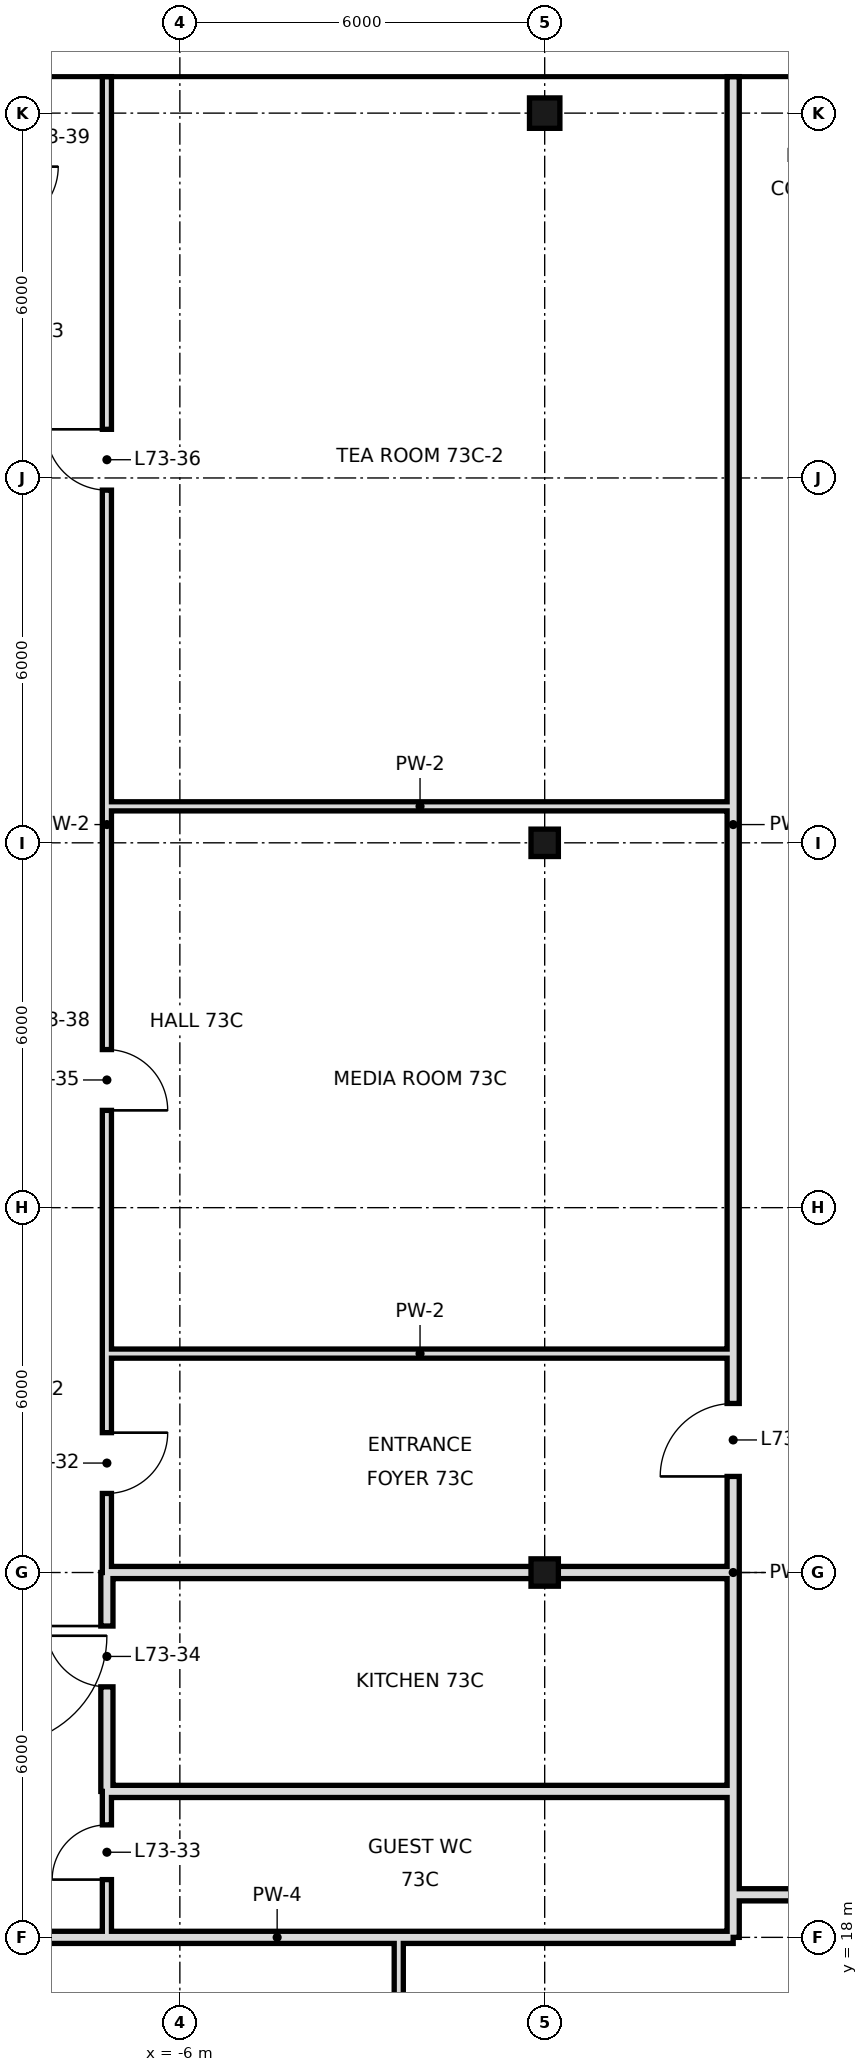
"""IFC4 building model, lengths in metres.
Left out: names, types, materials, properties, quantities, classifications, styles, units other than length and angle.
Written with IfcOpenShell. Run it as: python <this file> out.ifc"""

import sys

from ifc_helpers import new_model, si_unit, direction, frame, frame_2d, origin, origin_2d, place, context, subcontext, project, spatial, rectangle, hollow_rectangle, extrude, element, fill, save


model = new_model("IFC4")
c1 = context("Model", 3, precision=1e-05, world=origin(), true_north=direction((0.0, 1.0)))
c2 = subcontext(c1, "Body", "Model", "MODEL_VIEW")
j1 = project(units=[si_unit("LENGTHUNIT", "METRE"), si_unit("PLANEANGLEUNIT", "RADIAN")], contexts=[c1])
p1 = place(None, origin())
s1 = spatial("IfcSite", under=j1, at=p1, CompositionType="ELEMENT")
p2 = place(p1, origin())
s2 = spatial("IfcBuilding", under=s1, at=p2, CompositionType="ELEMENT")
p3 = place(p2, frame((0.0, 0.0, 308.8)))
s3 = spatial("IfcBuildingStorey", under=s2, at=p3, CompositionType="ELEMENT", Elevation=308.8)
for number, where, z_axis, x_axis in (
    (1, (0.0, 24.0, 0.0), (0.0, 0.0, 1.0), (1.0, 0.0, 0.0)),
    (2, (0.0, 36.0, 0.0), (0.0, 0.0, 1.0), (1.0, 0.0, 0.0)),
):
    element("IfcColumn", number, at=place(p3, frame(where, z_axis=z_axis, x_axis=x_axis)), inside=s3, PredefinedType="COLUMN", context=c2, shape_type="SweptSolid", body=[
        extrude(hollow_rectangle(XDim=0.45, YDim=0.45, WallThickness=0.022, at=origin_2d()), origin(), (0.0, 0.0, 1.0), 3.6),
    ])
p4 = place(p3, frame((0.0, 48.0, 0.0), z_axis=(0.0, 0.0, 1.0), x_axis=(1.0, 0.0, 0.0)))
e3 = element("IfcColumn", 3, at=p4, inside=s3, PredefinedType="COLUMN", context=c2, shape_type="SweptSolid", body=[
    extrude(hollow_rectangle(XDim=0.5, YDim=0.5, WallThickness=0.025, at=origin_2d()), origin(), (0.0, 0.0, 1.0), 3.6),
])
p5 = place(p3, frame((-2.4, 10.8, 0.0), z_axis=(0.0, 0.0, 1.0), x_axis=(0.0, 1.0, 0.0)))
e4 = element("IfcWall", 4, at=p5, inside=s3, PredefinedType="PARTITIONING", context=c2, shape_type="SweptSolid", body=[
    extrude(rectangle(XDim=7.2, YDim=0.15, at=frame_2d((3.6, 0.0))), origin(), (0.0, 0.0, 1.0), 3.42),
])
p6 = place(p3, frame((-7.2, 20.4, 0.0), z_axis=(0.0, 0.0, 1.0), x_axis=(0.0, 1.0, 0.0)))
e5 = element("IfcWall", 5, at=p6, inside=s3, PredefinedType="SOLIDWALL", context=c2, shape_type="SweptSolid", body=[
    extrude(rectangle(XDim=3.6, YDim=0.2, at=frame_2d((1.8, 0.0))), origin(), (0.0, 0.0, 1.0), 2.72),
])
p7 = place(p6, frame((1.72, 0.0, 0.0)))
e6 = element("IfcOpeningElement", 6, at=p7, cuts=e5, PredefinedType="OPENING", context=c2, shape_type="SweptSolid", body=[
    extrude(rectangle(XDim=1.0, YDim=2.4, at=frame_2d((0.5, 1.2))), frame((0.0, 0.11, 0.0), z_axis=(0.0, -1.0, 0.0), x_axis=(1.0, 0.0, 0.0)), (0.0, 0.0, 1.0), 0.22),
])
p8 = place(p3, frame((-7.2, 24.0, 0.0), z_axis=(0.0, 0.0, 1.0), x_axis=(0.0, 1.0, 0.0)))
e7 = element("IfcWall", 7, at=p8, inside=s3, PredefinedType="PARTITIONING", context=c2, shape_type="SweptSolid", body=[
    extrude(rectangle(XDim=24.6, YDim=0.15, at=frame_2d((12.3, 0.0))), origin(), (0.0, 0.0, 1.0), 3.42),
])
p9 = place(p8, frame((1.3, 0.0, 0.0)))
e8 = element("IfcOpeningElement", 8, at=p9, cuts=e7, PredefinedType="OPENING", context=c2, shape_type="SweptSolid", body=[
    extrude(rectangle(XDim=1.0, YDim=2.4, at=frame_2d((0.5, 1.2))), frame((0.0, 0.085, 0.0), z_axis=(0.0, -1.0, 0.0), x_axis=(1.0, 0.0, 0.0)), (0.0, 0.0, 1.0), 0.17),
])
p10 = place(p8, frame((7.6, 0.0, 0.0)))
e9 = element("IfcOpeningElement", 9, at=p10, cuts=e7, PredefinedType="OPENING", context=c2, shape_type="SweptSolid", body=[
    extrude(rectangle(XDim=1.0, YDim=2.4, at=frame_2d((0.5, 1.2))), frame((0.0, 0.085, 0.0), z_axis=(0.0, -1.0, 0.0), x_axis=(1.0, 0.0, 0.0)), (0.0, 0.0, 1.0), 0.17),
])
p11 = place(p8, frame((17.8, 0.0, 0.0)))
e10 = element("IfcOpeningElement", 10, at=p11, cuts=e7, PredefinedType="OPENING", context=c2, shape_type="SweptSolid", body=[
    extrude(rectangle(XDim=1.0, YDim=2.4, at=frame_2d((0.5, 1.2))), frame((0.0, 0.085, 0.0), z_axis=(0.0, -1.0, 0.0), x_axis=(1.0, 0.0, 0.0)), (0.0, 0.0, 1.0), 0.17),
])
p12 = place(p3, frame((-7.2, 18.0, 0.0), z_axis=(0.0, 0.0, 1.0), x_axis=(0.0, 1.0, 0.0)))
e11 = element("IfcWall", 11, at=p12, inside=s3, PredefinedType="PARTITIONING", context=c2, shape_type="SweptSolid", body=[
    extrude(rectangle(XDim=2.4, YDim=0.15, at=frame_2d((1.2, 0.0))), origin(), (0.0, 0.0, 1.0), 3.42),
])
p13 = place(p12, frame((0.95, 0.0, 0.0)))
e12 = element("IfcOpeningElement", 12, at=p13, cuts=e11, PredefinedType="OPENING", context=c2, shape_type="SweptSolid", body=[
    extrude(rectangle(XDim=0.9, YDim=2.4, at=frame_2d((0.45, 1.2))), frame((0.0, 0.085, 0.0), z_axis=(0.0, -1.0, 0.0), x_axis=(1.0, 0.0, 0.0)), (0.0, 0.0, 1.0), 0.17),
])
p14 = place(p3, frame((3.1, 18.7, 0.0), z_axis=(0.0, 0.0, 1.0), x_axis=(0.0, 1.0, 0.0)))
e13 = element("IfcWall", 13, at=p14, inside=s3, PredefinedType="SOLIDWALL", context=c2, shape_type="SweptSolid", body=[
    extrude(rectangle(XDim=1.7, YDim=0.2, at=frame_2d((0.85, 0.0))), origin(), (0.0, 0.0, 1.0), 3.42),
])
p15 = place(p3, frame((3.1, 24.0, 0.0), z_axis=(0.0, 0.0, 1.0), x_axis=(0.0, 1.0, 0.0)))
e14 = element("IfcWall", 14, at=p15, inside=s3, PredefinedType="SOLIDWALL", context=c2, shape_type="SweptSolid", body=[
    extrude(rectangle(XDim=24.6, YDim=0.2, at=frame_2d((12.3, 0.0))), origin(), (0.0, 0.0, 1.0), 2.72),
])
p16 = place(p15, frame((1.58, 0.0, 0.0)))
e15 = element("IfcOpeningElement", 15, at=p16, cuts=e14, PredefinedType="OPENING", context=c2, shape_type="SweptSolid", body=[
    extrude(rectangle(XDim=1.2, YDim=2.4, at=frame_2d((0.6, 1.2))), frame((0.0, 0.11, 0.0), z_axis=(0.0, -1.0, 0.0), x_axis=(1.0, 0.0, 0.0)), (0.0, 0.0, 1.0), 0.22),
])
p17 = place(p3, frame((3.1, 20.4, 0.0), z_axis=(0.0, 0.0, 1.0), x_axis=(0.0, 1.0, 0.0)))
e16 = element("IfcWall", 16, at=p17, inside=s3, PredefinedType="SOLIDWALL", context=c2, shape_type="SweptSolid", body=[
    extrude(rectangle(XDim=3.6, YDim=0.2, at=frame_2d((1.8, 0.0))), origin(), (0.0, 0.0, 1.0), 3.42),
])
p18 = place(p3, frame((3.1, 18.0, 0.0), z_axis=(0.0, 0.0, 1.0), x_axis=(0.0, 1.0, 0.0)))
e17 = element("IfcWall", 17, at=p18, inside=s3, PredefinedType="SOLIDWALL", context=c2, shape_type="SweptSolid", body=[
    extrude(rectangle(XDim=0.7, YDim=0.2, at=frame_2d((0.35, 0.0))), origin(), (0.0, 0.0, 1.0), 2.97),
])
p19 = place(p3, frame((-12.6, 18.0, 0.0), z_axis=(0.0, 0.0, 1.0), x_axis=(1.0, 0.0, 0.0)))
e18 = element("IfcWall", 18, at=p19, inside=s3, PredefinedType="SOLIDWALL", context=c2, shape_type="SweptSolid", body=[
    extrude(rectangle(XDim=15.7, YDim=0.2, at=frame_2d((7.85, 0.0))), origin(), (0.0, 0.0, 1.0), 2.72),
])
p20 = place(p3, frame((3.1, 18.7, 0.0), z_axis=(0.0, 0.0, 1.0), x_axis=(1.0, 0.0, 0.0)))
e19 = element("IfcWall", 19, at=p20, inside=s3, PredefinedType="SOLIDWALL", context=c2, shape_type="SweptSolid", body=[
    extrude(rectangle(XDim=17.3, YDim=0.2, at=frame_2d((8.65, 0.0))), origin(), (0.0, 0.0, 1.0), 2.72),
])
p21 = place(p20, frame((6.12, 0.0, 0.0)))
e20 = element("IfcOpeningElement", 20, at=p21, cuts=e19, PredefinedType="OPENING", context=c2, shape_type="SweptSolid", body=[
    extrude(rectangle(XDim=1.2, YDim=2.4, at=frame_2d((0.6, 1.2))), frame((0.0, 0.11, 0.0), z_axis=(0.0, -1.0, 0.0), x_axis=(1.0, 0.0, 0.0)), (0.0, 0.0, 1.0), 0.22),
])
p22 = place(p20, frame((13.7, 0.0, 0.0)))
e21 = element("IfcOpeningElement", 21, at=p22, cuts=e19, PredefinedType="OPENING", context=c2, shape_type="SweptSolid", body=[
    extrude(rectangle(XDim=1.2, YDim=2.4, at=frame_2d((0.6, 1.2))), frame((0.0, 0.11, 0.0), z_axis=(0.0, -1.0, 0.0), x_axis=(1.0, 0.0, 0.0)), (0.0, 0.0, 1.0), 0.22),
])
for number, where, z_axis, x_axis in (
    (22, (-7.2, 20.4, 0.0), (0.0, 0.0, 1.0), (1.0, 0.0, 0.0)),
    (23, (-7.2, 24.0, 0.0), (0.0, 0.0, 1.0), (1.0, 0.0, 0.0)),
):
    element("IfcWall", number, at=place(p3, frame(where, z_axis=z_axis, x_axis=x_axis)), inside=s3, PredefinedType="SOLIDWALL", context=c2, shape_type="SweptSolid", body=[
        extrude(rectangle(XDim=10.3, YDim=0.2, at=frame_2d((5.15, 0.0))), origin(), (0.0, 0.0, 1.0), 2.72),
    ])
for number, where, z_axis, x_axis in (
    (24, (-7.2, 27.6, 0.0), (0.0, 0.0, 1.0), (1.0, 0.0, 0.0)),
    (25, (-7.2, 36.6, 0.0), (0.0, 0.0, 1.0), (1.0, 0.0, 0.0)),
):
    element("IfcWall", number, at=place(p3, frame(where, z_axis=z_axis, x_axis=x_axis)), inside=s3, PredefinedType="PARTITIONING", context=c2, shape_type="SweptSolid", body=[
        extrude(rectangle(XDim=10.3, YDim=0.15, at=frame_2d((5.15, 0.0))), origin(), (0.0, 0.0, 1.0), 3.42),
    ])
p23 = place(p9, origin())
e26 = element("IfcDoor", 26, at=p23, inside=s3, OperationType="SINGLE_SWING_RIGHT", PredefinedType="DOOR", context=c2, shape_type="SweptSolid", body=[
    extrude(rectangle(XDim=1.0, YDim=2.4, at=frame_2d((0.5, 1.2))), frame((0.0, 0.025, 0.0), z_axis=(0.0, -1.0, 0.0), x_axis=(1.0, 0.0, 0.0)), (0.0, 0.0, 1.0), 0.05),
])
fill(e8, e26)
p24 = place(p13, origin())
e27 = element("IfcDoor", 27, at=p24, inside=s3, OperationType="SINGLE_SWING_LEFT", PredefinedType="DOOR", context=c2, shape_type="SweptSolid", body=[
    extrude(rectangle(XDim=0.9, YDim=2.4, at=frame_2d((0.45, 1.2))), frame((0.0, 0.025, 0.0), z_axis=(0.0, -1.0, 0.0), x_axis=(1.0, 0.0, 0.0)), (0.0, 0.0, 1.0), 0.05),
])
fill(e12, e27)
p25 = place(p7, frame((1.0, 0.0, 0.0), z_axis=(0.0, 0.0, 1.0), x_axis=(-1.0, 0.0, 0.0)))
e28 = element("IfcDoor", 28, at=p25, inside=s3, OperationType="SINGLE_SWING_LEFT", PredefinedType="DOOR", context=c2, shape_type="SweptSolid", body=[
    extrude(rectangle(XDim=1.0, YDim=2.4, at=frame_2d((0.5, 1.2))), frame((0.0, 0.025, 0.0), z_axis=(0.0, -1.0, 0.0), x_axis=(1.0, 0.0, 0.0)), (0.0, 0.0, 1.0), 0.05),
])
fill(e6, e28)
p26 = place(p10, frame((1.0, 0.0, 0.0), z_axis=(0.0, 0.0, 1.0), x_axis=(-1.0, 0.0, 0.0)))
e29 = element("IfcDoor", 29, at=p26, inside=s3, OperationType="SINGLE_SWING_RIGHT", PredefinedType="DOOR", context=c2, shape_type="SweptSolid", body=[
    extrude(rectangle(XDim=1.0, YDim=2.4, at=frame_2d((0.5, 1.2))), frame((0.0, 0.025, 0.0), z_axis=(0.0, -1.0, 0.0), x_axis=(1.0, 0.0, 0.0)), (0.0, 0.0, 1.0), 0.05),
])
fill(e9, e29)
p27 = place(p11, frame((1.0, 0.0, 0.0), z_axis=(0.0, 0.0, 1.0), x_axis=(-1.0, 0.0, 0.0)))
e30 = element("IfcDoor", 30, at=p27, inside=s3, OperationType="SINGLE_SWING_LEFT", PredefinedType="DOOR", context=c2, shape_type="SweptSolid", body=[
    extrude(rectangle(XDim=1.0, YDim=2.4, at=frame_2d((0.5, 1.2))), frame((0.0, 0.025, 0.0), z_axis=(0.0, -1.0, 0.0), x_axis=(1.0, 0.0, 0.0)), (0.0, 0.0, 1.0), 0.05),
])
fill(e10, e30)
p28 = place(p16, origin())
e31 = element("IfcDoor", 31, at=p28, inside=s3, OperationType="SINGLE_SWING_LEFT", PredefinedType="DOOR", context=c2, shape_type="SweptSolid", body=[
    extrude(rectangle(XDim=1.2, YDim=2.4, at=frame_2d((0.6, 1.2))), frame((0.0, 0.025, 0.0), z_axis=(0.0, -1.0, 0.0), x_axis=(1.0, 0.0, 0.0)), (0.0, 0.0, 1.0), 0.05),
])
fill(e15, e31)
save(model, sys.argv[1])
